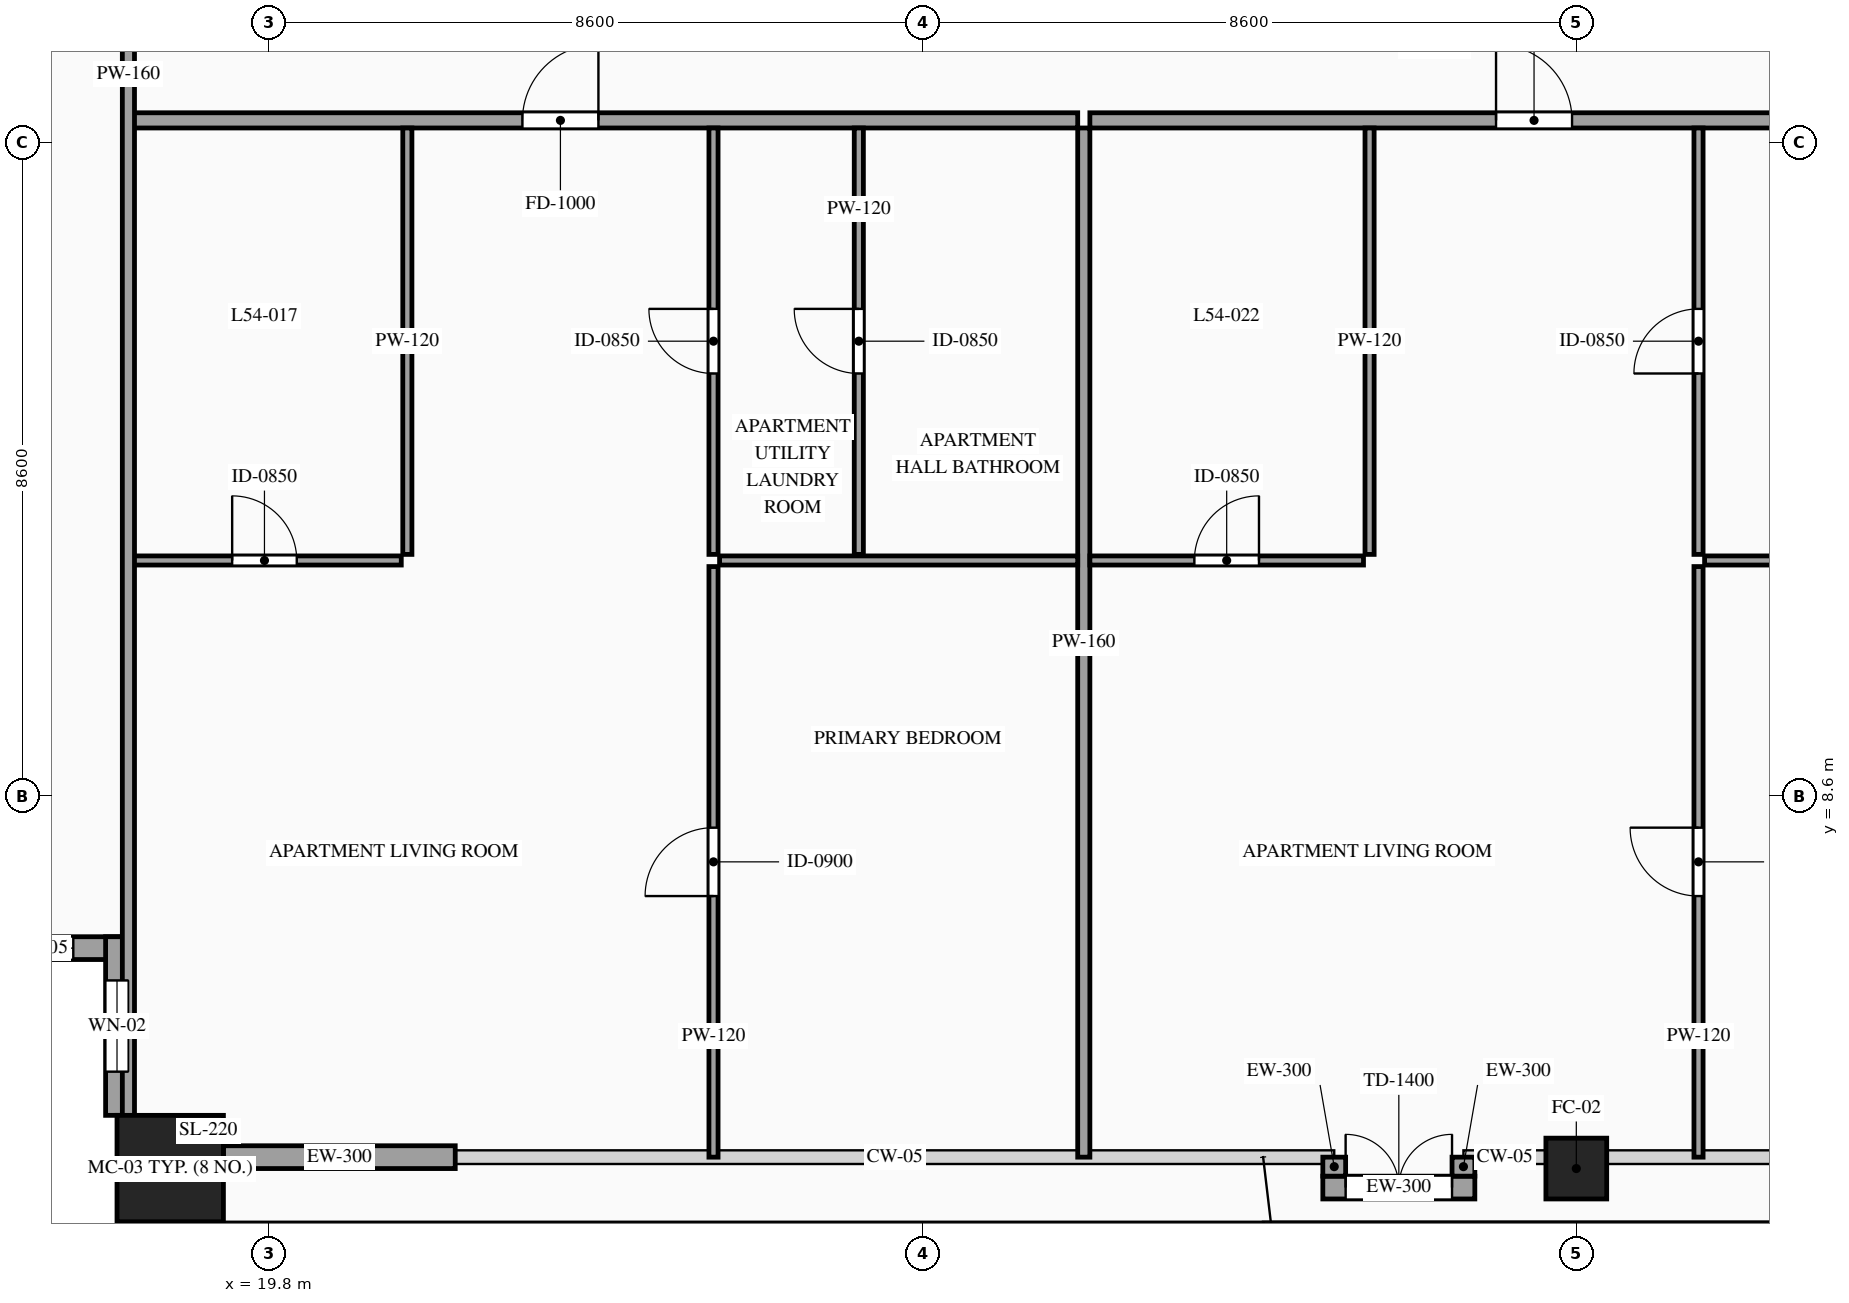
"""IFC4 building model, lengths in metres.
Left out: names, types, materials, properties, quantities, classifications, styles, units other than length and angle.
Written with IfcOpenShell. Run it as: python <this file> out.ifc"""

import sys

from ifc_helpers import new_model, si_unit, direction, frame, frame_2d, origin, origin_2d, place, context, subcontext, project, spatial, rectangle, hollow_rectangle, extrude, source, transform, mapped, element, fill, save


model = new_model("IFC4")
c1 = context("Model", 3, precision=1e-05, world=origin(), true_north=direction((0.0, 1.0)))
c2 = subcontext(c1, "Body", "Model", "MODEL_VIEW")
j1 = project(units=[si_unit("LENGTHUNIT", "METRE"), si_unit("PLANEANGLEUNIT", "RADIAN")], contexts=[c1])
p1 = place(None, origin())
s1 = spatial("IfcSite", under=j1, at=p1, CompositionType="ELEMENT")
p2 = place(p1, origin())
s2 = spatial("IfcBuilding", under=s1, at=p2, CompositionType="ELEMENT")
p3 = place(p2, frame((0.0, 0.0, 205.5)))
s3 = spatial("IfcBuildingStorey", under=s2, at=p3, CompositionType="ELEMENT", Elevation=205.5)
m1 = source(origin(), c2, "Body", "SweptSolid", [
    extrude(hollow_rectangle(XDim=1.4, YDim=1.4, WallThickness=0.06, at=origin_2d()), origin(), (0.0, 0.0, 1.0), 3.5),
])
p4 = place(p3, frame((18.5, 3.7, 0.0), z_axis=(0.0, 0.0, 1.0), x_axis=(1.0, 0.0, 0.0)))
e1 = element("IfcColumn", 1, at=p4, inside=s3, PredefinedType="COLUMN", context=c2, shape_type="MappedRepresentation", body=[
    mapped(m1, transform((0.0, 0.0, 0.0), scale=1.0)),
])
m2 = source(origin(), c2, "Body", "SweptSolid", [
    extrude(hollow_rectangle(XDim=0.8, YDim=0.8, WallThickness=0.036, at=origin_2d()), origin(), (0.0, 0.0, 1.0), 3.5),
])
p5 = place(p3, frame((37.0, 3.7, 0.0), z_axis=(0.0, 0.0, 1.0), x_axis=(1.0, 0.0, 0.0)))
e2 = element("IfcColumn", 2, at=p5, inside=s3, PredefinedType="COLUMN", context=c2, shape_type="MappedRepresentation", body=[
    mapped(m2, transform((0.0, 0.0, 0.0), scale=1.0)),
])
p6 = place(p3, frame((15.6, 6.6, 0.0), z_axis=(0.0, 0.0, 1.0), x_axis=(1.0, 0.0, 0.0)))
e3 = element("IfcWall", 3, at=p6, inside=s3, PredefinedType="SOLIDWALL", context=c2, shape_type="SweptSolid", body=[
    extrude(rectangle(XDim=2.35, YDim=0.3, at=frame_2d((1.175, 0.0))), origin(), (0.0, 0.0, 1.0), 3.28),
])
p7 = place(p6, frame((0.725, 0.0, 0.85)))
e4 = element("IfcOpeningElement", 4, at=p7, cuts=e3, PredefinedType="OPENING", context=c2, shape_type="SweptSolid", body=[
    extrude(rectangle(XDim=0.9, YDim=1.5, at=frame_2d((0.45, 0.75))), frame((0.0, 0.165, 0.0), z_axis=(0.0, -1.0, 0.0), x_axis=(1.0, 0.0, 0.0)), (0.0, 0.0, 1.0), 0.33),
])
p8 = place(p3, frame((17.8, 6.75, 0.0), z_axis=(0.0, 0.0, 1.0), x_axis=(0.0, -1.0, 0.0)))
e5 = element("IfcWall", 5, at=p8, inside=s3, PredefinedType="SOLIDWALL", context=c2, shape_type="SweptSolid", body=[
    extrude(rectangle(XDim=2.35, YDim=0.3, at=frame_2d((1.175, 0.0))), origin(), (0.0, 0.0, 1.0), 3.28),
])
p9 = place(p8, frame((0.575, 0.0, 0.85)))
e6 = element("IfcOpeningElement", 6, at=p9, cuts=e5, PredefinedType="OPENING", context=c2, shape_type="SweptSolid", body=[
    extrude(rectangle(XDim=1.2, YDim=2.1, at=frame_2d((0.6, 1.05))), frame((0.0, 0.165, 0.0), z_axis=(0.0, -1.0, 0.0), x_axis=(1.0, 0.0, 0.0)), (0.0, 0.0, 1.0), 0.33),
])
m3 = source(origin(), c2, "Body", "SweptSolid", [
    extrude(rectangle(XDim=3.05, YDim=0.3, at=frame_2d((1.525, 0.0))), origin(), (0.0, 0.0, 1.0), 2.835),
])
p10 = place(p3, frame((19.2, 3.85, 0.0), z_axis=(0.0, 0.0, 1.0), x_axis=(1.0, 0.0, 0.0)))
e7 = element("IfcWall", 7, at=p10, inside=s3, PredefinedType="SOLIDWALL", context=c2, shape_type="MappedRepresentation", body=[
    mapped(m3, transform((0.0, 0.0, 0.0), scale=1.0)),
])
p11 = place(p3, frame((33.665, 3.45, 0.0), z_axis=(0.0, 0.0, 1.0), x_axis=(1.0, 0.0, 0.0)))
e8 = element("IfcWall", 8, at=p11, inside=s3, PredefinedType="SOLIDWALL", context=c2, shape_type="SweptSolid", body=[
    extrude(rectangle(XDim=2.0, YDim=0.3, at=frame_2d((1.0, 0.0))), origin(), (0.0, 0.0, 1.0), 2.835),
])
p12 = place(p11, frame((0.3, 0.0, 0.0)))
e9 = element("IfcOpeningElement", 9, at=p12, cuts=e8, PredefinedType="OPENING", context=c2, shape_type="SweptSolid", body=[
    extrude(rectangle(XDim=1.4, YDim=2.3, at=frame_2d((0.7, 1.15))), frame((0.0, 0.165, 0.0), z_axis=(0.0, -1.0, 0.0), x_axis=(1.0, 0.0, 0.0)), (0.0, 0.0, 1.0), 0.33),
])
m4 = source(origin(), c2, "Body", "SweptSolid", [
    extrude(rectangle(XDim=0.25, YDim=0.3, at=frame_2d((0.125, 0.0))), origin(), (0.0, 0.0, 1.0), 3.28),
])
for number, where, z_axis, x_axis in (
    (10, (33.815, 3.85, 0.0), (0.0, 0.0, 1.0), (0.0, -1.0, 0.0)),
    (11, (35.515, 3.6, 0.0), (0.0, 0.0, 1.0), (0.0, 1.0, 0.0)),
):
    element("IfcWall", number, at=place(p3, frame(where, z_axis=z_axis, x_axis=x_axis)), inside=s3, PredefinedType="SOLIDWALL", context=c2, shape_type="MappedRepresentation", body=[
        mapped(m4, transform((0.0, 0.0, 0.0), scale=1.0)),
    ])
p13 = place(p3, frame((17.94, 17.49, 0.0), z_axis=(0.0, 0.0, 1.0), x_axis=(1.0, 0.0, 0.0)))
e12 = element("IfcWall", 12, at=p13, inside=s3, PredefinedType="PARTITIONING", context=c2, shape_type="SweptSolid", body=[
    extrude(rectangle(XDim=12.5, YDim=0.2, at=frame_2d((6.25, 0.0))), origin(), (0.0, 0.0, 1.0), 3.28),
])
p14 = place(p13, frame((5.194, 0.0, 0.0)))
e13 = element("IfcOpeningElement", 13, at=p14, cuts=e12, PredefinedType="OPENING", context=c2, shape_type="SweptSolid", body=[
    extrude(rectangle(XDim=1.0, YDim=2.2, at=frame_2d((0.5, 1.1))), frame((0.0, 0.115, 0.0), z_axis=(0.0, -1.0, 0.0), x_axis=(1.0, 0.0, 0.0)), (0.0, 0.0, 1.0), 0.23),
])
m5 = source(origin(), c2, "Body", "SweptSolid", [
    extrude(rectangle(XDim=13.54, YDim=0.16, at=frame_2d((6.77, 0.0))), origin(), (0.0, 0.0, 1.0), 3.28),
])
p15 = place(p3, frame((30.52, 3.85, 0.0), z_axis=(0.0, 0.0, 1.0), x_axis=(0.0, 1.0, 0.0)))
e14 = element("IfcWall", 14, at=p15, inside=s3, PredefinedType="PARTITIONING", context=c2, shape_type="MappedRepresentation", body=[
    mapped(m5, transform((0.0, 0.0, 0.0), scale=1.0)),
])
p16 = place(p3, frame((17.94, 11.7, 0.0), z_axis=(0.0, 0.0, 1.0), x_axis=(1.0, 0.0, 0.0)))
e15 = element("IfcWall", 15, at=p16, inside=s3, PredefinedType="PARTITIONING", context=c2, shape_type="SweptSolid", body=[
    extrude(rectangle(XDim=3.6, YDim=0.12, at=frame_2d((1.8, 0.0))), origin(), (0.0, 0.0, 1.0), 3.28),
])
p17 = place(p16, frame((1.375, 0.0, 0.0)))
e16 = element("IfcOpeningElement", 16, at=p17, cuts=e15, PredefinedType="OPENING", context=c2, shape_type="SweptSolid", body=[
    extrude(rectangle(XDim=0.85, YDim=2.1, at=frame_2d((0.425, 1.05))), frame((0.0, 0.075, 0.0), z_axis=(0.0, -1.0, 0.0), x_axis=(1.0, 0.0, 0.0)), (0.0, 0.0, 1.0), 0.15),
])
m6 = source(origin(), c2, "Body", "SweptSolid", [
    extrude(rectangle(XDim=5.61, YDim=0.12, at=frame_2d((2.805, 0.0))), origin(), (0.0, 0.0, 1.0), 3.28),
])
p18 = place(p3, frame((21.62, 11.78, 0.0), z_axis=(0.0, 0.0, 1.0), x_axis=(0.0, 1.0, 0.0)))
e17 = element("IfcWall", 17, at=p18, inside=s3, PredefinedType="PARTITIONING", context=c2, shape_type="MappedRepresentation", body=[
    mapped(m6, transform((0.0, 0.0, 0.0), scale=1.0)),
])
p19 = place(p3, frame((27.56, 11.78, 0.0), z_axis=(0.0, 0.0, 1.0), x_axis=(0.0, 1.0, 0.0)))
e18 = element("IfcWall", 18, at=p19, inside=s3, PredefinedType="PARTITIONING", context=c2, shape_type="SweptSolid", body=[
    extrude(rectangle(XDim=5.61, YDim=0.12, at=frame_2d((2.805, 0.0))), origin(), (0.0, 0.0, 1.0), 3.28),
])
p20 = place(p19, frame((2.38, 0.0, 0.0)))
e19 = element("IfcOpeningElement", 19, at=p20, cuts=e18, PredefinedType="OPENING", context=c2, shape_type="SweptSolid", body=[
    extrude(rectangle(XDim=0.85, YDim=2.1, at=frame_2d((0.425, 1.05))), frame((0.0, 0.075, 0.0), z_axis=(0.0, -1.0, 0.0), x_axis=(1.0, 0.0, 0.0)), (0.0, 0.0, 1.0), 0.15),
])
m7 = source(origin(), c2, "Body", "SweptSolid", [
    extrude(rectangle(XDim=4.712, YDim=0.12, at=frame_2d((2.356, 0.0))), origin(), (0.0, 0.0, 1.0), 2.875),
])
p21 = place(p3, frame((25.728, 11.7, 0.0), z_axis=(0.0, 0.0, 1.0), x_axis=(1.0, 0.0, 0.0)))
e20 = element("IfcWall", 20, at=p21, inside=s3, PredefinedType="PARTITIONING", context=c2, shape_type="MappedRepresentation", body=[
    mapped(m7, transform((0.0, 0.0, 0.0), scale=1.0)),
])
p22 = place(p3, frame((25.648, 3.85, 0.0), z_axis=(0.0, 0.0, 1.0), x_axis=(0.0, 1.0, 0.0)))
e21 = element("IfcWall", 21, at=p22, inside=s3, PredefinedType="PARTITIONING", context=c2, shape_type="SweptSolid", body=[
    extrude(rectangle(XDim=7.77, YDim=0.12, at=frame_2d((3.885, 0.0))), origin(), (0.0, 0.0, 1.0), 3.28),
])
p23 = place(p22, frame((3.435, 0.0, 0.0)))
e22 = element("IfcOpeningElement", 22, at=p23, cuts=e21, PredefinedType="OPENING", context=c2, shape_type="SweptSolid", body=[
    extrude(rectangle(XDim=0.9, YDim=2.15, at=frame_2d((0.45, 1.075))), frame((0.0, 0.075, 0.0), z_axis=(0.0, -1.0, 0.0), x_axis=(1.0, 0.0, 0.0)), (0.0, 0.0, 1.0), 0.15),
])
p24 = place(p3, frame((25.648, 11.78, 0.0), z_axis=(0.0, 0.0, 1.0), x_axis=(0.0, 1.0, 0.0)))
e23 = element("IfcWall", 23, at=p24, inside=s3, PredefinedType="PARTITIONING", context=c2, shape_type="SweptSolid", body=[
    extrude(rectangle(XDim=5.61, YDim=0.12, at=frame_2d((2.805, 0.0))), origin(), (0.0, 0.0, 1.0), 3.28),
])
p25 = place(p24, frame((2.38, 0.0, 0.0)))
e24 = element("IfcOpeningElement", 24, at=p25, cuts=e23, PredefinedType="OPENING", context=c2, shape_type="SweptSolid", body=[
    extrude(rectangle(XDim=0.85, YDim=2.1, at=frame_2d((0.425, 1.05))), frame((0.0, 0.075, 0.0), z_axis=(0.0, -1.0, 0.0), x_axis=(1.0, 0.0, 0.0)), (0.0, 0.0, 1.0), 0.15),
])
p26 = place(p3, frame((30.6, 17.49, 0.0), z_axis=(0.0, 0.0, 1.0), x_axis=(1.0, 0.0, 0.0)))
e25 = element("IfcWall", 25, at=p26, inside=s3, PredefinedType="PARTITIONING", context=c2, shape_type="SweptSolid", body=[
    extrude(rectangle(XDim=12.8, YDim=0.2, at=frame_2d((6.4, 0.0))), origin(), (0.0, 0.0, 1.0), 3.28),
])
p27 = place(p26, frame((5.344, 0.0, 0.0)))
e26 = element("IfcOpeningElement", 26, at=p27, cuts=e25, PredefinedType="OPENING", context=c2, shape_type="SweptSolid", body=[
    extrude(rectangle(XDim=1.0, YDim=2.2, at=frame_2d((0.5, 1.1))), frame((0.0, 0.115, 0.0), z_axis=(0.0, -1.0, 0.0), x_axis=(1.0, 0.0, 0.0)), (0.0, 0.0, 1.0), 0.23),
])
p28 = place(p3, frame((30.6, 11.7, 0.0), z_axis=(0.0, 0.0, 1.0), x_axis=(1.0, 0.0, 0.0)))
e27 = element("IfcWall", 27, at=p28, inside=s3, PredefinedType="PARTITIONING", context=c2, shape_type="SweptSolid", body=[
    extrude(rectangle(XDim=3.6, YDim=0.12, at=frame_2d((1.8, 0.0))), origin(), (0.0, 0.0, 1.0), 2.875),
])
p29 = place(p28, frame((1.375, 0.0, 0.0)))
e28 = element("IfcOpeningElement", 28, at=p29, cuts=e27, PredefinedType="OPENING", context=c2, shape_type="SweptSolid", body=[
    extrude(rectangle(XDim=0.85, YDim=2.1, at=frame_2d((0.425, 1.05))), frame((0.0, 0.075, 0.0), z_axis=(0.0, -1.0, 0.0), x_axis=(1.0, 0.0, 0.0)), (0.0, 0.0, 1.0), 0.15),
])
p30 = place(p3, frame((34.28, 11.78, 0.0), z_axis=(0.0, 0.0, 1.0), x_axis=(0.0, 1.0, 0.0)))
e29 = element("IfcWall", 29, at=p30, inside=s3, PredefinedType="PARTITIONING", context=c2, shape_type="MappedRepresentation", body=[
    mapped(m6, transform((0.0, 0.0, 0.0), scale=1.0)),
])
p31 = place(p3, frame((38.688, 11.7, 0.0), z_axis=(0.0, 0.0, 1.0), x_axis=(1.0, 0.0, 0.0)))
e30 = element("IfcWall", 30, at=p31, inside=s3, PredefinedType="PARTITIONING", context=c2, shape_type="MappedRepresentation", body=[
    mapped(m7, transform((0.0, 0.0, 0.0), scale=1.0)),
])
p32 = place(p3, frame((38.608, 3.85, 0.0), z_axis=(0.0, 0.0, 1.0), x_axis=(0.0, 1.0, 0.0)))
e31 = element("IfcWall", 31, at=p32, inside=s3, PredefinedType="PARTITIONING", context=c2, shape_type="SweptSolid", body=[
    extrude(rectangle(XDim=7.77, YDim=0.12, at=frame_2d((3.885, 0.0))), origin(), (0.0, 0.0, 1.0), 3.28),
])
p33 = place(p32, frame((3.435, 0.0, 0.0)))
e32 = element("IfcOpeningElement", 32, at=p33, cuts=e31, PredefinedType="OPENING", context=c2, shape_type="SweptSolid", body=[
    extrude(rectangle(XDim=0.9, YDim=2.15, at=frame_2d((0.45, 1.075))), frame((0.0, 0.075, 0.0), z_axis=(0.0, -1.0, 0.0), x_axis=(1.0, 0.0, 0.0)), (0.0, 0.0, 1.0), 0.15),
])
p34 = place(p3, frame((38.608, 11.78, 0.0), z_axis=(0.0, 0.0, 1.0), x_axis=(0.0, 1.0, 0.0)))
e33 = element("IfcWall", 33, at=p34, inside=s3, PredefinedType="PARTITIONING", context=c2, shape_type="SweptSolid", body=[
    extrude(rectangle(XDim=5.61, YDim=0.12, at=frame_2d((2.805, 0.0))), origin(), (0.0, 0.0, 1.0), 3.28),
])
p35 = place(p34, frame((2.38, 0.0, 0.0)))
e34 = element("IfcOpeningElement", 34, at=p35, cuts=e33, PredefinedType="OPENING", context=c2, shape_type="SweptSolid", body=[
    extrude(rectangle(XDim=0.85, YDim=2.1, at=frame_2d((0.425, 1.05))), frame((0.0, 0.075, 0.0), z_axis=(0.0, -1.0, 0.0), x_axis=(1.0, 0.0, 0.0)), (0.0, 0.0, 1.0), 0.15),
])
m8 = source(origin(), c2, "Body", "SweptSolid", [
    extrude(rectangle(XDim=28.19, YDim=0.16, at=frame_2d((14.095, 0.0))), origin(), (0.0, 0.0, 1.0), 3.28),
])
p36 = place(p3, frame((17.95, 4.0, 0.0), z_axis=(0.0, 0.0, 1.0), x_axis=(0.0, 1.0, 0.0)))
e35 = element("IfcWall", 35, at=p36, inside=s3, PredefinedType="PARTITIONING", context=c2, shape_type="MappedRepresentation", body=[
    mapped(m8, transform((0.0, 0.0, 0.0), scale=1.0)),
])
m9 = source(origin(), c2, "Body", "SweptSolid", [
    extrude(rectangle(XDim=0.9, YDim=1.5, at=frame_2d((0.45, 0.75))), frame((0.0, 0.03, 0.0), z_axis=(0.0, -1.0, 0.0), x_axis=(1.0, 0.0, 0.0)), (0.0, 0.0, 1.0), 0.06),
])
p37 = place(p7, origin())
e36 = element("IfcWindow", 36, at=p37, inside=s3, PartitioningType="SINGLE_PANEL", PredefinedType="WINDOW", context=c2, shape_type="MappedRepresentation", body=[
    mapped(m9, transform((0.0, 0.0, 0.0), scale=1.0)),
])
fill(e4, e36)
m10 = source(origin(), c2, "Body", "SweptSolid", [
    extrude(rectangle(XDim=1.2, YDim=2.1, at=frame_2d((0.6, 1.05))), frame((0.0, 0.03, 0.0), z_axis=(0.0, -1.0, 0.0), x_axis=(1.0, 0.0, 0.0)), (0.0, 0.0, 1.0), 0.06),
])
p38 = place(p9, origin())
e37 = element("IfcWindow", 37, at=p38, inside=s3, PartitioningType="SINGLE_PANEL", PredefinedType="WINDOW", context=c2, shape_type="MappedRepresentation", body=[
    mapped(m10, transform((0.0, 0.0, 0.0), scale=1.0)),
])
fill(e6, e37)
m11 = source(origin(), c2, "Body", "SweptSolid", [
    extrude(rectangle(XDim=1.4, YDim=2.3, at=frame_2d((0.7, 1.15))), frame((0.0, 0.025, 0.0), z_axis=(0.0, -1.0, 0.0), x_axis=(1.0, 0.0, 0.0)), (0.0, 0.0, 1.0), 0.05),
])
p39 = place(p12, origin())
e38 = element("IfcDoor", 38, at=p39, inside=s3, OperationType="DOUBLE_DOOR_SINGLE_SWING", PredefinedType="DOOR", context=c2, shape_type="MappedRepresentation", body=[
    mapped(m11, transform((0.0, 0.0, 0.0), scale=1.0)),
])
fill(e9, e38)
m12 = source(origin(), c2, "Body", "SweptSolid", [
    extrude(rectangle(XDim=1.0, YDim=2.2, at=frame_2d((0.5, 1.1))), frame((0.0, 0.025, 0.0), z_axis=(0.0, -1.0, 0.0), x_axis=(1.0, 0.0, 0.0)), (0.0, 0.0, 1.0), 0.05),
])
p40 = place(p14, origin())
e39 = element("IfcDoor", 39, at=p40, inside=s3, OperationType="SINGLE_SWING_RIGHT", PredefinedType="DOOR", context=c2, shape_type="MappedRepresentation", body=[
    mapped(m12, transform((0.0, 0.0, 0.0), scale=1.0)),
])
fill(e13, e39)
m13 = source(origin(), c2, "Body", "SweptSolid", [
    extrude(rectangle(XDim=0.85, YDim=2.1, at=frame_2d((0.425, 1.05))), frame((0.0, 0.025, 0.0), z_axis=(0.0, -1.0, 0.0), x_axis=(1.0, 0.0, 0.0)), (0.0, 0.0, 1.0), 0.05),
])
p41 = place(p17, origin())
e40 = element("IfcDoor", 40, at=p41, inside=s3, OperationType="SINGLE_SWING_LEFT", PredefinedType="DOOR", context=c2, shape_type="MappedRepresentation", body=[
    mapped(m13, transform((0.0, 0.0, 0.0), scale=1.0)),
])
fill(e16, e40)
p42 = place(p20, origin())
e41 = element("IfcDoor", 41, at=p42, inside=s3, OperationType="SINGLE_SWING_RIGHT", PredefinedType="DOOR", context=c2, shape_type="MappedRepresentation", body=[
    mapped(m13, transform((0.0, 0.0, 0.0), scale=1.0)),
])
fill(e19, e41)
m14 = source(origin(), c2, "Body", "SweptSolid", [
    extrude(rectangle(XDim=0.9, YDim=2.15, at=frame_2d((0.45, 1.075))), frame((0.0, 0.025, 0.0), z_axis=(0.0, -1.0, 0.0), x_axis=(1.0, 0.0, 0.0)), (0.0, 0.0, 1.0), 0.05),
])
p43 = place(p23, origin())
e42 = element("IfcDoor", 42, at=p43, inside=s3, OperationType="SINGLE_SWING_LEFT", PredefinedType="DOOR", context=c2, shape_type="MappedRepresentation", body=[
    mapped(m14, transform((0.0, 0.0, 0.0), scale=1.0)),
])
fill(e22, e42)
p44 = place(p25, origin())
e43 = element("IfcDoor", 43, at=p44, inside=s3, OperationType="SINGLE_SWING_RIGHT", PredefinedType="DOOR", context=c2, shape_type="MappedRepresentation", body=[
    mapped(m13, transform((0.0, 0.0, 0.0), scale=1.0)),
])
fill(e24, e43)
p45 = place(p27, origin())
e44 = element("IfcDoor", 44, at=p45, inside=s3, OperationType="SINGLE_SWING_LEFT", PredefinedType="DOOR", context=c2, shape_type="MappedRepresentation", body=[
    mapped(m12, transform((0.0, 0.0, 0.0), scale=1.0)),
])
fill(e26, e44)
p46 = place(p29, origin())
e45 = element("IfcDoor", 45, at=p46, inside=s3, OperationType="SINGLE_SWING_RIGHT", PredefinedType="DOOR", context=c2, shape_type="MappedRepresentation", body=[
    mapped(m13, transform((0.0, 0.0, 0.0), scale=1.0)),
])
fill(e28, e45)
p47 = place(p33, origin())
e46 = element("IfcDoor", 46, at=p47, inside=s3, OperationType="SINGLE_SWING_RIGHT", PredefinedType="DOOR", context=c2, shape_type="MappedRepresentation", body=[
    mapped(m14, transform((0.0, 0.0, 0.0), scale=1.0)),
])
fill(e32, e46)
p48 = place(p35, origin())
e47 = element("IfcDoor", 47, at=p48, inside=s3, OperationType="SINGLE_SWING_LEFT", PredefinedType="DOOR", context=c2, shape_type="MappedRepresentation", body=[
    mapped(m13, transform((0.0, 0.0, 0.0), scale=1.0)),
])
fill(e34, e47)
save(model, sys.argv[1])
